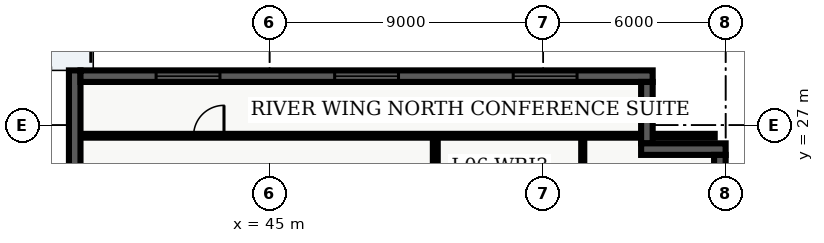
"""IFC4 building model, lengths in metres.
Left out: names, types, materials, properties, quantities, classifications, styles, units other than length and angle.
Written with IfcOpenShell. Run it as: python <this file> out.ifc"""

import sys

from ifc_helpers import new_model, entity, si_unit, converted_unit, direction, frame, origin_with_axes, origin_2d_with_axis, place, context, subcontext, project, spatial, polyline, rectangle, outline, extrude, element, fill, save


model = new_model("IFC4")
c1 = context("Model", 3, precision=1e-05, world=origin_with_axes(), true_north=direction((0.0, 1.0)))
c2 = subcontext(c1, "Body", "Model", "MODEL_VIEW")
j1 = project(units=[si_unit("LENGTHUNIT", "METRE"), converted_unit("PLANEANGLEUNIT", "DEGREE", entity("IfcPlaneAngleMeasure", 0.017), si_unit("PLANEANGLEUNIT", "RADIAN"), dimensions=[0, 0, 0, 0, 0, 0, 0])], contexts=[c1])
p1 = place(None, origin_with_axes())
s1 = spatial("IfcSite", under=j1, at=p1, CompositionType="ELEMENT")
p2 = place(p1, origin_with_axes())
s2 = spatial("IfcBuilding", under=s1, at=p2, CompositionType="ELEMENT")
p3 = place(p2, frame((0.0, 0.0, 28.8), z_axis=(0.0, 0.0, 1.0), x_axis=(1.0, 0.0, 0.0)))
s3 = spatial("IfcBuildingStorey", under=s2, at=p3, CompositionType="ELEMENT", Elevation=28.8)
p4 = place(p3, frame((50.45, 7.85, 0.0), z_axis=(0.0, 0.0, 1.0), x_axis=(0.0, 1.0, 0.0)))
e1 = element("IfcWall", 1, at=p4, inside=s3, PredefinedType="PARTITIONING", context=c2, shape_type="SweptSolid", body=[
    extrude(outline(polyline([(0.0, -0.08), (18.8, -0.08), (18.8, 0.08), (0.0, 0.08), (0.0, -0.08)])), origin_with_axes(), (0.0, 0.0, 1.0), 2.7),
])
p5 = place(p4, frame((4.564, 0.0, 0.0), z_axis=(0.0, 0.0, 1.0), x_axis=(1.0, 0.0, 0.0)))
e2 = element("IfcOpeningElement", 2, at=p5, cuts=e1, PredefinedType="OPENING", context=c2, shape_type="SweptSolid", body=[
    extrude(rectangle(XDim=1.0, YDim=0.18, at=origin_2d_with_axis()), origin_with_axes(), (0.0, 0.0, 1.0), 2.15),
])
p6 = place(p4, frame((11.541, 0.0, 0.0), z_axis=(0.0, 0.0, 1.0), x_axis=(1.0, 0.0, 0.0)))
e3 = element("IfcOpeningElement", 3, at=p6, cuts=e1, PredefinedType="OPENING", context=c2, shape_type="SweptSolid", body=[
    extrude(rectangle(XDim=1.0, YDim=0.18, at=origin_2d_with_axis()), origin_with_axes(), (0.0, 0.0, 1.0), 2.15),
])
p7 = place(p4, frame((14.125, 0.0, 0.0), z_axis=(0.0, 0.0, 1.0), x_axis=(1.0, 0.0, 0.0)))
e4 = element("IfcOpeningElement", 4, at=p7, cuts=e1, PredefinedType="OPENING", context=c2, shape_type="SweptSolid", body=[
    extrude(rectangle(XDim=1.0, YDim=0.18, at=origin_2d_with_axis()), origin_with_axes(), (0.0, 0.0, 1.0), 2.15),
])
p8 = place(p3, frame((38.76, 26.65, 0.0), z_axis=(0.0, 0.0, 1.0), x_axis=(1.0, 0.0, 0.0)))
e5 = element("IfcWall", 5, at=p8, inside=s3, PredefinedType="PARTITIONING", context=c2, shape_type="SweptSolid", body=[
    extrude(outline(polyline([(0.0, -0.062), (20.88, -0.062), (20.88, 0.062), (0.0, 0.062), (0.0, -0.062)])), origin_with_axes(), (0.0, 0.0, 1.0), 2.7),
])
p9 = place(p8, frame((4.24, 0.0, 0.0), z_axis=(0.0, 0.0, 1.0), x_axis=(1.0, 0.0, 0.0)))
e6 = element("IfcOpeningElement", 6, at=p9, cuts=e5, PredefinedType="OPENING", context=c2, shape_type="SweptSolid", body=[
    extrude(rectangle(XDim=1.0, YDim=0.145, at=origin_2d_with_axis()), origin_with_axes(), (0.0, 0.0, 1.0), 2.15),
])
p10 = place(p3, frame((55.3, 7.98, 0.0), z_axis=(0.0, 0.0, 1.0), x_axis=(0.0, 1.0, 0.0)))
e7 = element("IfcWall", 7, at=p10, inside=s3, PredefinedType="PARTITIONING", context=c2, shape_type="SweptSolid", body=[
    extrude(outline(polyline([(0.0, -0.05), (18.54, -0.05), (18.54, 0.05), (0.0, 0.05), (0.0, -0.05)])), origin_with_axes(), (0.0, 0.0, 1.0), 2.7),
])
p11 = place(p10, frame((4.434, 0.0, 0.0), z_axis=(0.0, 0.0, 1.0), x_axis=(1.0, 0.0, 0.0)))
e8 = element("IfcOpeningElement", 8, at=p11, cuts=e7, PredefinedType="OPENING", context=c2, shape_type="SweptSolid", body=[
    extrude(rectangle(XDim=0.95, YDim=0.12, at=origin_2d_with_axis()), origin_with_axes(), (0.0, 0.0, 1.0), 2.15),
])
p12 = place(p10, frame((11.132, 0.0, 0.0), z_axis=(0.0, 0.0, 1.0), x_axis=(1.0, 0.0, 0.0)))
e9 = element("IfcOpeningElement", 9, at=p12, cuts=e7, PredefinedType="OPENING", context=c2, shape_type="SweptSolid", body=[
    extrude(rectangle(XDim=0.95, YDim=0.12, at=origin_2d_with_axis()), origin_with_axes(), (0.0, 0.0, 1.0), 2.15),
])
p13 = place(p10, frame((15.967, 0.0, 0.0), z_axis=(0.0, 0.0, 1.0), x_axis=(1.0, 0.0, 0.0)))
e10 = element("IfcOpeningElement", 10, at=p13, cuts=e7, PredefinedType="OPENING", context=c2, shape_type="SweptSolid", body=[
    extrude(rectangle(XDim=0.95, YDim=0.12, at=origin_2d_with_axis()), origin_with_axes(), (0.0, 0.0, 1.0), 2.15),
])
p14 = place(p3, frame((38.59, 21.22, 0.0), z_axis=(0.0, 0.0, 1.0), x_axis=(0.0, 1.0, 0.0)))
e11 = element("IfcWall", 11, at=p14, inside=s3, PredefinedType="SOLIDWALL", context=c2, shape_type="SweptSolid", body=[
    extrude(outline(polyline([(0.0, -0.19), (7.58, -0.19), (7.58, 0.19), (0.0, 0.19), (0.0, -0.19)])), origin_with_axes(), (0.0, 0.0, 1.0), 3.66),
])
p15 = place(p3, frame((38.78, 28.61, 0.0), z_axis=(0.0, 0.0, 1.0), x_axis=(1.0, 0.0, 0.0)))
e12 = element("IfcWall", 12, at=p15, inside=s3, PredefinedType="SOLIDWALL", context=c2, shape_type="SweptSolid", body=[
    extrude(outline(polyline([(0.0, -0.19), (18.82, -0.19), (18.82, 0.19), (0.0, 0.19), (0.0, -0.19)])), origin_with_axes(), (0.0, 0.0, 1.0), 3.66),
])
p16 = place(p15, frame((3.537, 0.0, 0.45), z_axis=(0.0, 0.0, 1.0), x_axis=(1.0, 0.0, 0.0)))
e13 = element("IfcOpeningElement", 13, at=p16, cuts=e12, PredefinedType="OPENING", context=c2, shape_type="SweptSolid", body=[
    extrude(rectangle(XDim=2.1, YDim=0.4, at=origin_2d_with_axis()), origin_with_axes(), (0.0, 0.0, 1.0), 2.2),
])
p17 = place(p15, frame((9.41, 0.0, 0.45), z_axis=(0.0, 0.0, 1.0), x_axis=(1.0, 0.0, 0.0)))
e14 = element("IfcOpeningElement", 14, at=p17, cuts=e12, PredefinedType="OPENING", context=c2, shape_type="SweptSolid", body=[
    extrude(rectangle(XDim=2.1, YDim=0.4, at=origin_2d_with_axis()), origin_with_axes(), (0.0, 0.0, 1.0), 2.2),
])
p18 = place(p15, frame((15.283, 0.0, 0.45), z_axis=(0.0, 0.0, 1.0), x_axis=(1.0, 0.0, 0.0)))
e15 = element("IfcOpeningElement", 15, at=p18, cuts=e12, PredefinedType="OPENING", context=c2, shape_type="SweptSolid", body=[
    extrude(rectangle(XDim=2.1, YDim=0.4, at=origin_2d_with_axis()), origin_with_axes(), (0.0, 0.0, 1.0), 2.2),
])
p19 = place(p3, frame((57.41, 28.42, 0.0), z_axis=(0.0, 0.0, 1.0), x_axis=(0.0, -1.0, 0.0)))
e16 = element("IfcWall", 16, at=p19, inside=s3, PredefinedType="SOLIDWALL", context=c2, shape_type="SweptSolid", body=[
    extrude(outline(polyline([(0.0, -0.19), (2.02, -0.19), (2.02, 0.19), (0.0, 0.19), (0.0, -0.19)])), origin_with_axes(), (0.0, 0.0, 1.0), 3.66),
])
p20 = place(p3, frame((57.22, 26.21, 0.0), z_axis=(0.0, 0.0, 1.0), x_axis=(1.0, 0.0, 0.0)))
e17 = element("IfcWall", 17, at=p20, inside=s3, PredefinedType="SOLIDWALL", context=c2, shape_type="SweptSolid", body=[
    extrude(outline(polyline([(0.0, -0.19), (2.78, -0.19), (2.78, 0.19), (0.0, 0.19), (0.0, -0.19)])), origin_with_axes(), (0.0, 0.0, 1.0), 3.66),
])
p21 = place(p3, frame((59.81, 26.02, 0.0), z_axis=(0.0, 0.0, 1.0), x_axis=(0.0, -1.0, 0.0)))
e18 = element("IfcWall", 18, at=p21, inside=s3, PredefinedType="SOLIDWALL", context=c2, shape_type="SweptSolid", body=[
    extrude(outline(polyline([(0.0, -0.19), (23.62, -0.19), (23.62, 0.19), (0.0, 0.19), (0.0, -0.19)])), origin_with_axes(), (0.0, 0.0, 1.0), 3.66),
])
p22 = place(p21, frame((20.218, 0.0, 0.45), z_axis=(0.0, 0.0, 1.0), x_axis=(1.0, 0.0, 0.0)))
e19 = element("IfcOpeningElement", 19, at=p22, cuts=e18, PredefinedType="OPENING", context=c2, shape_type="SweptSolid", body=[
    extrude(rectangle(XDim=2.1, YDim=0.4, at=origin_2d_with_axis()), origin_with_axes(), (0.0, 0.0, 1.0), 2.2),
])
p23 = place(p8, frame((4.24, 0.0, 0.0), z_axis=(0.0, 0.0, 1.0), x_axis=(1.0, 0.0, 0.0)))
e20 = element("IfcDoor", 20, at=p23, inside=s3, OperationType="SINGLE_SWING_RIGHT", PredefinedType="DOOR", context=c2, shape_type="SweptSolid", body=[
    extrude(rectangle(XDim=1.0, YDim=0.075, at=origin_2d_with_axis()), origin_with_axes(), (0.0, 0.0, 1.0), 2.15),
])
fill(e6, e20)
p24 = place(p15, frame((3.537, 0.0, 0.45), z_axis=(0.0, 0.0, 1.0), x_axis=(1.0, 0.0, 0.0)))
e21 = element("IfcWindow", 21, at=p24, inside=s3, PredefinedType="WINDOW", context=c2, shape_type="SweptSolid", body=[
    extrude(rectangle(XDim=2.1, YDim=0.09, at=origin_2d_with_axis()), origin_with_axes(), (0.0, 0.0, 1.0), 2.2),
])
fill(e13, e21)
p25 = place(p15, frame((9.41, 0.0, 0.45), z_axis=(0.0, 0.0, 1.0), x_axis=(1.0, 0.0, 0.0)))
e22 = element("IfcWindow", 22, at=p25, inside=s3, PredefinedType="WINDOW", context=c2, shape_type="SweptSolid", body=[
    extrude(rectangle(XDim=2.1, YDim=0.09, at=origin_2d_with_axis()), origin_with_axes(), (0.0, 0.0, 1.0), 2.2),
])
fill(e14, e22)
p26 = place(p15, frame((15.283, 0.0, 0.45), z_axis=(0.0, 0.0, 1.0), x_axis=(1.0, 0.0, 0.0)))
e23 = element("IfcWindow", 23, at=p26, inside=s3, PredefinedType="WINDOW", context=c2, shape_type="SweptSolid", body=[
    extrude(rectangle(XDim=2.1, YDim=0.09, at=origin_2d_with_axis()), origin_with_axes(), (0.0, 0.0, 1.0), 2.2),
])
fill(e15, e23)
save(model, sys.argv[1])
